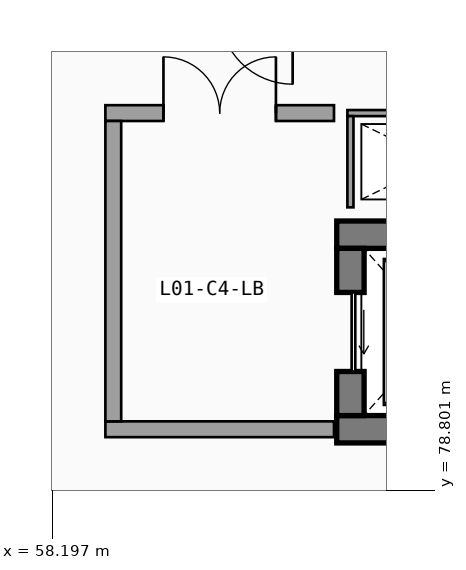
"""IFC4 building model, lengths in metres.
Left out: names, types, materials, properties, quantities, classifications, styles, units other than length and angle.
Written with IfcOpenShell. Run it as: python <this file> out.ifc"""

import sys

from ifc_helpers import new_model, si_unit, direction, frame, frame_2d, origin, place, context, subcontext, project, spatial, rectangle, extrude, element, fill, save


model = new_model("IFC4")
c1 = context("Model", 3, precision=1e-05, world=origin(), true_north=direction((0.0, 1.0)))
c2 = subcontext(c1, "Body", "Model", "MODEL_VIEW")
j1 = project(units=[si_unit("LENGTHUNIT", "METRE"), si_unit("PLANEANGLEUNIT", "RADIAN")], contexts=[c1])
p1 = place(None, origin())
s1 = spatial("IfcSite", under=j1, at=p1, CompositionType="ELEMENT")
p2 = place(p1, origin())
s2 = spatial("IfcBuilding", under=s1, at=p2, CompositionType="ELEMENT")
p3 = place(p2, frame((0.0, 0.0, 4.8)))
s3 = spatial("IfcBuildingStorey", under=s2, at=p3, CompositionType="ELEMENT", Elevation=4.8)
for number, where, z_axis, x_axis in (
    (1, (62.875, 79.8, 0.0), (0.0, 0.0, 1.0), (1.0, 0.0, 0.0)),
    (2, (66.225, 83.0, 0.0), (0.0, 0.0, 1.0), (-1.0, 0.0, 0.0)),
):
    element("IfcWall", number, at=place(p3, frame(where, z_axis=z_axis, x_axis=x_axis)), inside=s3, PredefinedType="SHEAR", context=c2, shape_type="SweptSolid", body=[
        extrude(rectangle(XDim=3.35, YDim=0.45, at=frame_2d((1.675, 0.0))), origin(), (0.0, 0.0, 1.0), 4.52),
    ])
p4 = place(p3, frame((63.1, 82.775, 0.0), z_axis=(0.0, 0.0, 1.0), x_axis=(0.0, -1.0, 0.0)))
e3 = element("IfcWall", 3, at=p4, inside=s3, PredefinedType="SHEAR", context=c2, shape_type="SweptSolid", body=[
    extrude(rectangle(XDim=2.75, YDim=0.45, at=frame_2d((1.375, 0.0))), origin(), (0.0, 0.0, 1.0), 4.52),
])
p5 = place(p4, frame((0.725, 0.0, 0.0), z_axis=(0.0, 0.0, 1.0), x_axis=(1.0, 0.0, 0.0)))
e4 = element("IfcOpeningElement", 4, at=p5, cuts=e3, PredefinedType="OPENING", context=c2, shape_type="SweptSolid", body=[
    extrude(rectangle(XDim=1.3, YDim=2.25, at=frame_2d((0.65, 1.125))), frame((0.0, 0.235, 0.0), z_axis=(0.0, -1.0, 0.0), x_axis=(1.0, 0.0, 0.0)), (0.0, 0.0, 1.0), 0.47),
])
p6 = place(p3, frame((66.05, 85.0, 0.0), z_axis=(0.0, 0.0, 1.0), x_axis=(-1.0, 0.0, 0.0)))
e5 = element("IfcWall", 5, at=p6, inside=s3, PredefinedType="PARTITIONING", context=c2, shape_type="SweptSolid", body=[
    extrude(rectangle(XDim=3.0, YDim=0.1, at=frame_2d((1.5, 0.0))), origin(), (0.0, 0.0, 1.0), 4.52),
])
p7 = place(p3, frame((63.1, 84.95, 0.0), z_axis=(0.0, 0.0, 1.0), x_axis=(0.0, -1.0, 0.0)))
e6 = element("IfcWall", 6, at=p7, inside=s3, PredefinedType="PARTITIONING", context=c2, shape_type="SweptSolid", body=[
    extrude(rectangle(XDim=1.5, YDim=0.1, at=frame_2d((0.75, 0.0))), origin(), (0.0, 0.0, 1.0), 4.52),
])
p8 = place(p3, frame((59.07, 79.8, 0.0), z_axis=(0.0, 0.0, 1.0), x_axis=(1.0, 0.0, 0.0)))
e7 = element("IfcWall", 7, at=p8, inside=s3, PredefinedType="SOLIDWALL", context=c2, shape_type="SweptSolid", body=[
    extrude(rectangle(XDim=3.76, YDim=0.26, at=frame_2d((1.88, 0.0))), origin(), (0.0, 0.0, 1.0), 4.52),
])
p9 = place(p3, frame((62.83, 85.0, 0.0), z_axis=(0.0, 0.0, 1.0), x_axis=(-1.0, 0.0, 0.0)))
e8 = element("IfcWall", 8, at=p9, inside=s3, PredefinedType="SOLIDWALL", context=c2, shape_type="SweptSolid", body=[
    extrude(rectangle(XDim=3.76, YDim=0.26, at=frame_2d((1.88, 0.0))), origin(), (0.0, 0.0, 1.0), 4.52),
])
p10 = place(p9, frame((2.805, 0.0, 0.0), z_axis=(0.0, 0.0, 1.0), x_axis=(-1.0, 0.0, 0.0)))
e9 = element("IfcOpeningElement", 9, at=p10, cuts=e8, PredefinedType="OPENING", context=c2, shape_type="SweptSolid", body=[
    extrude(rectangle(XDim=1.85, YDim=2.25, at=frame_2d((0.925, 1.125))), frame((0.0, 0.14, 0.0), z_axis=(0.0, -1.0, 0.0), x_axis=(1.0, 0.0, 0.0)), (0.0, 0.0, 1.0), 0.28),
])
p11 = place(p3, frame((59.2, 84.87, 0.0), z_axis=(0.0, 0.0, 1.0), x_axis=(0.0, -1.0, 0.0)))
e10 = element("IfcWall", 10, at=p11, inside=s3, PredefinedType="SOLIDWALL", context=c2, shape_type="SweptSolid", body=[
    extrude(rectangle(XDim=4.94, YDim=0.26, at=frame_2d((2.47, 0.0))), origin(), (0.0, 0.0, 1.0), 4.52),
])
p12 = place(p5, origin())
e11 = element("IfcDoor", 11, at=p12, inside=s3, OperationType="SLIDING_TO_RIGHT", PredefinedType="DOOR", context=c2, shape_type="SweptSolid", body=[
    extrude(rectangle(XDim=1.3, YDim=2.25, at=frame_2d((0.65, 1.125))), frame((0.0, 0.025, 0.0), z_axis=(0.0, -1.0, 0.0), x_axis=(1.0, 0.0, 0.0)), (0.0, 0.0, 1.0), 0.05),
])
fill(e4, e11)
p13 = place(p10, origin())
e12 = element("IfcDoor", 12, at=p13, inside=s3, OperationType="DOUBLE_DOOR_SINGLE_SWING", PredefinedType="DOOR", context=c2, shape_type="SweptSolid", body=[
    extrude(rectangle(XDim=1.85, YDim=2.25, at=frame_2d((0.925, 1.125))), frame((0.0, 0.025, 0.0), z_axis=(0.0, -1.0, 0.0), x_axis=(1.0, 0.0, 0.0)), (0.0, 0.0, 1.0), 0.05),
])
fill(e9, e12)
save(model, sys.argv[1])
